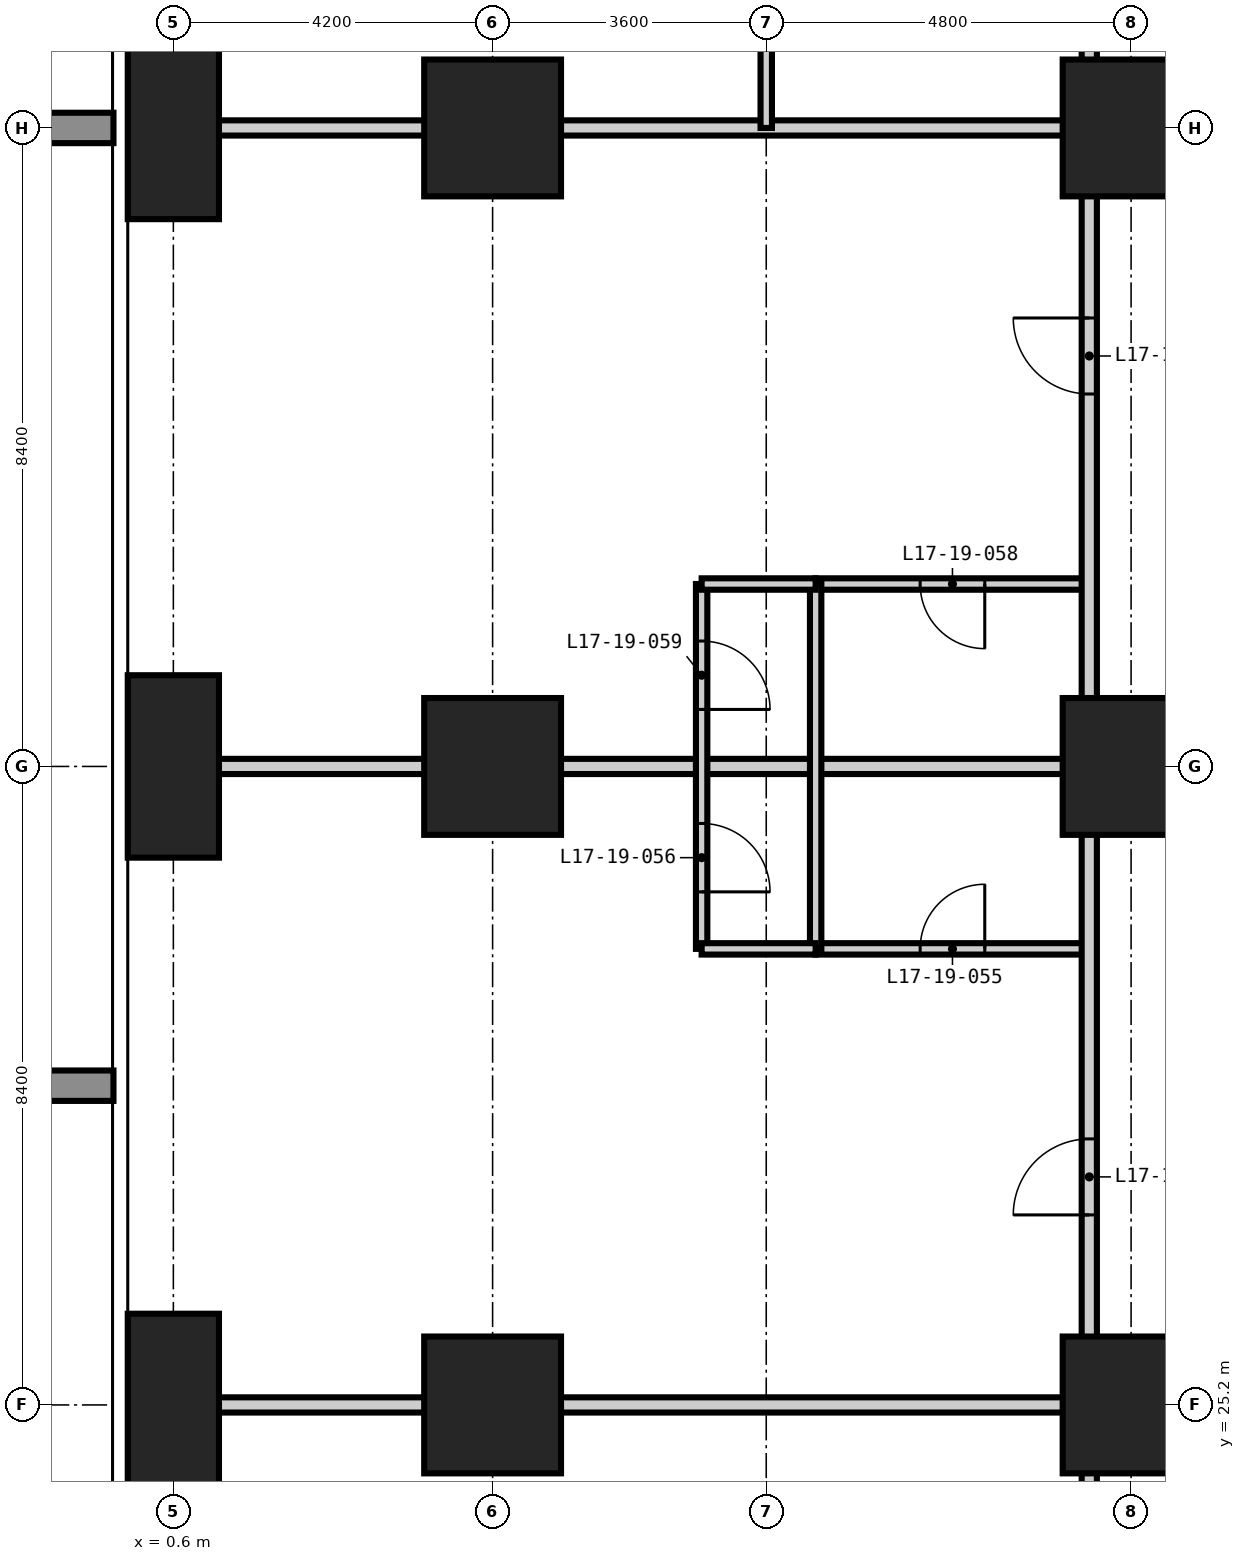
"""IFC4 building model, lengths in metres.
Left out: names, types, materials, properties, quantities, classifications, styles, units other than length and angle.
Written with IfcOpenShell. Run it as: python <this file> out.ifc"""

import sys

from ifc_helpers import new_model, si_unit, direction, frame, frame_2d, origin, origin_2d, place, context, subcontext, project, spatial, rectangle, extrude, element, fill, save


model = new_model("IFC4")
c1 = context("Model", 3, precision=1e-05, world=origin(), true_north=direction((0.0, 1.0)))
c2 = subcontext(c1, "Body", "Model", "MODEL_VIEW")
j1 = project(units=[si_unit("LENGTHUNIT", "METRE"), si_unit("PLANEANGLEUNIT", "RADIAN")], contexts=[c1])
p1 = place(None, origin())
s1 = spatial("IfcSite", under=j1, at=p1, CompositionType="ELEMENT")
p2 = place(p1, origin())
s2 = spatial("IfcBuilding", under=s1, at=p2, CompositionType="ELEMENT")
p3 = place(p2, frame((0.0, 0.0, 70.2)))
s3 = spatial("IfcBuildingStorey", under=s2, at=p3, CompositionType="ELEMENT", Elevation=70.2)
for number, where, z_axis, x_axis in (
    (1, (0.6, 25.2, -0.35), (0.0, 0.0, 1.0), (1.0, 0.0, 0.0)),
    (2, (0.6, 33.6, -0.35), (0.0, 0.0, 1.0), (1.0, 0.0, 0.0)),
    (3, (0.6, 42.0, -0.35), (0.0, 0.0, 1.0), (1.0, 0.0, 0.0)),
):
    element("IfcColumn", number, at=place(p3, frame(where, z_axis=z_axis, x_axis=x_axis)), inside=s3, PredefinedType="COLUMN", context=c2, shape_type="SweptSolid", body=[
        extrude(rectangle(XDim=1.2, YDim=2.4, at=origin_2d()), origin(), (0.0, 0.0, 1.0), 3.6),
    ])
for number, where, z_axis, x_axis in (
    (4, (4.8, 25.2, -0.35), (0.0, 0.0, 1.0), (1.0, 0.0, 0.0)),
    (5, (4.8, 33.6, -0.35), (0.0, 0.0, 1.0), (1.0, 0.0, 0.0)),
    (6, (4.8, 42.0, -0.35), (0.0, 0.0, 1.0), (1.0, 0.0, 0.0)),
    (7, (13.2, 25.2, -0.35), (0.0, 0.0, 1.0), (1.0, 0.0, 0.0)),
    (8, (13.2, 33.6, -0.35), (0.0, 0.0, 1.0), (1.0, 0.0, 0.0)),
    (9, (13.2, 42.0, -0.35), (0.0, 0.0, 1.0), (1.0, 0.0, 0.0)),
):
    element("IfcColumn", number, at=place(p3, frame(where, z_axis=z_axis, x_axis=x_axis)), inside=s3, PredefinedType="COLUMN", context=c2, shape_type="SweptSolid", body=[
        extrude(rectangle(XDim=1.8, YDim=1.8, at=origin_2d()), origin(), (0.0, 0.0, 1.0), 3.6),
    ])
p4 = place(p3, frame((9.05, 31.2, 0.0), z_axis=(0.0, 0.0, 1.0), x_axis=(1.0, 0.0, 0.0)))
e10 = element("IfcWall", 10, at=p4, inside=s3, PredefinedType="PARTITIONING", context=c2, shape_type="SweptSolid", body=[
    extrude(rectangle(XDim=3.6, YDim=0.15, at=frame_2d((1.8, 0.0))), origin(), (0.0, 0.0, 1.0), 3.25),
])
p5 = place(p4, frame((1.375, 0.0, 0.0)))
e11 = element("IfcOpeningElement", 11, at=p5, cuts=e10, PredefinedType="OPENING", context=c2, shape_type="SweptSolid", body=[
    extrude(rectangle(XDim=0.85, YDim=2.1, at=frame_2d((0.425, 1.05))), frame((0.0, 0.085, 0.0), z_axis=(0.0, -1.0, 0.0), x_axis=(1.0, 0.0, 0.0)), (0.0, 0.0, 1.0), 0.17),
])
p6 = place(p3, frame((9.05, 36.0, 0.0), z_axis=(0.0, 0.0, 1.0), x_axis=(1.0, 0.0, 0.0)))
e12 = element("IfcWall", 12, at=p6, inside=s3, PredefinedType="PARTITIONING", context=c2, shape_type="SweptSolid", body=[
    extrude(rectangle(XDim=3.6, YDim=0.15, at=frame_2d((1.8, 0.0))), origin(), (0.0, 0.0, 1.0), 3.25),
])
p7 = place(p6, frame((1.375, 0.0, 0.0)))
e13 = element("IfcOpeningElement", 13, at=p7, cuts=e12, PredefinedType="OPENING", context=c2, shape_type="SweptSolid", body=[
    extrude(rectangle(XDim=0.85, YDim=2.1, at=frame_2d((0.425, 1.05))), frame((0.0, 0.085, 0.0), z_axis=(0.0, -1.0, 0.0), x_axis=(1.0, 0.0, 0.0)), (0.0, 0.0, 1.0), 0.17),
])
p8 = place(p3, frame((12.65, 12.65, 0.0), z_axis=(0.0, 0.0, 1.0), x_axis=(0.0, 1.0, 0.0)))
e14 = element("IfcWall", 14, at=p8, inside=s3, PredefinedType="PARTITIONING", context=c2, shape_type="SweptSolid", body=[
    extrude(rectangle(XDim=32.9, YDim=0.2, at=frame_2d((16.45, 0.0))), origin(), (0.0, 0.0, 1.0), 3.25),
])
p9 = place(p8, frame((9.05, 0.0, 0.0)))
e15 = element("IfcOpeningElement", 15, at=p9, cuts=e14, PredefinedType="OPENING", context=c2, shape_type="SweptSolid", body=[
    extrude(rectangle(XDim=1.0, YDim=2.2, at=frame_2d((0.5, 1.1))), frame((0.0, 0.11, 0.0), z_axis=(0.0, -1.0, 0.0), x_axis=(1.0, 0.0, 0.0)), (0.0, 0.0, 1.0), 0.22),
])
p10 = place(p8, frame((15.05, 0.0, 0.0)))
e16 = element("IfcOpeningElement", 16, at=p10, cuts=e14, PredefinedType="OPENING", context=c2, shape_type="SweptSolid", body=[
    extrude(rectangle(XDim=1.0, YDim=2.2, at=frame_2d((0.5, 1.1))), frame((0.0, 0.11, 0.0), z_axis=(0.0, -1.0, 0.0), x_axis=(1.0, 0.0, 0.0)), (0.0, 0.0, 1.0), 0.22),
])
p11 = place(p8, frame((25.85, 0.0, 0.0)))
e17 = element("IfcOpeningElement", 17, at=p11, cuts=e14, PredefinedType="OPENING", context=c2, shape_type="SweptSolid", body=[
    extrude(rectangle(XDim=1.0, YDim=2.2, at=frame_2d((0.5, 1.1))), frame((0.0, 0.11, 0.0), z_axis=(0.0, -1.0, 0.0), x_axis=(1.0, 0.0, 0.0)), (0.0, 0.0, 1.0), 0.22),
])
p12 = place(p8, frame((1.575, 0.0, 0.0)))
e18 = element("IfcOpeningElement", 18, at=p12, cuts=e14, PredefinedType="OPENING", context=c2, shape_type="SweptSolid", body=[
    extrude(rectangle(XDim=1.0, YDim=2.2, at=frame_2d((0.5, 1.1))), frame((0.0, 0.11, 0.0), z_axis=(0.0, -1.0, 0.0), x_axis=(1.0, 0.0, 0.0)), (0.0, 0.0, 1.0), 0.22),
])
p13 = place(p8, frame((30.625, 0.0, 0.0)))
e19 = element("IfcOpeningElement", 19, at=p13, cuts=e14, PredefinedType="OPENING", context=c2, shape_type="SweptSolid", body=[
    extrude(rectangle(XDim=1.0, YDim=2.2, at=frame_2d((0.5, 1.1))), frame((0.0, 0.11, 0.0), z_axis=(0.0, -1.0, 0.0), x_axis=(1.0, 0.0, 0.0)), (0.0, 0.0, 1.0), 0.22),
])
for number, where, z_axis, x_axis in (
    (20, (-0.008, 25.2, 0.0), (0.0, 0.0, 1.0), (1.0, 0.0, 0.0)),
    (21, (-0.008, 33.6, 0.0), (0.0, 0.0, 1.0), (1.0, 0.0, 0.0)),
    (22, (-0.008, 42.0, 0.0), (0.0, 0.0, 1.0), (1.0, 0.0, 0.0)),
):
    element("IfcWall", number, at=place(p3, frame(where, z_axis=z_axis, x_axis=x_axis)), inside=s3, PredefinedType="PARTITIONING", context=c2, shape_type="SweptSolid", body=[
        extrude(rectangle(XDim=12.658, YDim=0.2, at=frame_2d((6.329, 0.0))), origin(), (0.0, 0.0, 1.0), 3.25),
    ])
p14 = place(p3, frame((7.55, 31.2, 0.0), z_axis=(0.0, 0.0, 1.0), x_axis=(0.0, 1.0, 0.0)))
e23 = element("IfcWall", 23, at=p14, inside=s3, PredefinedType="PARTITIONING", context=c2, shape_type="SweptSolid", body=[
    extrude(rectangle(XDim=4.8, YDim=0.15, at=frame_2d((2.4, 0.0))), origin(), (0.0, 0.0, 1.0), 3.25),
])
p15 = place(p14, frame((0.75, 0.0, 0.0)))
e24 = element("IfcOpeningElement", 24, at=p15, cuts=e23, PredefinedType="OPENING", context=c2, shape_type="SweptSolid", body=[
    extrude(rectangle(XDim=0.9, YDim=2.1, at=frame_2d((0.45, 1.05))), frame((0.0, 0.085, 0.0), z_axis=(0.0, -1.0, 0.0), x_axis=(1.0, 0.0, 0.0)), (0.0, 0.0, 1.0), 0.17),
])
p16 = place(p14, frame((3.15, 0.0, 0.0)))
e25 = element("IfcOpeningElement", 25, at=p16, cuts=e23, PredefinedType="OPENING", context=c2, shape_type="SweptSolid", body=[
    extrude(rectangle(XDim=0.9, YDim=2.1, at=frame_2d((0.45, 1.05))), frame((0.0, 0.085, 0.0), z_axis=(0.0, -1.0, 0.0), x_axis=(1.0, 0.0, 0.0)), (0.0, 0.0, 1.0), 0.17),
])
p17 = place(p3, frame((8.4, 42.0, 0.0), z_axis=(0.0, 0.0, 1.0), x_axis=(0.0, 1.0, 0.0)))
e26 = element("IfcWall", 26, at=p17, inside=s3, PredefinedType="PARTITIONING", context=c2, shape_type="SweptSolid", body=[
    extrude(rectangle(XDim=16.808, YDim=0.15, at=frame_2d((8.404, 0.0))), origin(), (0.0, 0.0, 1.0), 3.25),
])
p18 = place(p17, frame((13.95, 0.0, 0.0)))
e27 = element("IfcOpeningElement", 27, at=p18, cuts=e26, PredefinedType="OPENING", context=c2, shape_type="SweptSolid", body=[
    extrude(rectangle(XDim=0.9, YDim=2.1, at=frame_2d((0.45, 1.05))), frame((0.0, 0.085, 0.0), z_axis=(0.0, -1.0, 0.0), x_axis=(1.0, 0.0, 0.0)), (0.0, 0.0, 1.0), 0.17),
])
p19 = place(p17, frame((3.75, 0.0, 0.0)))
e28 = element("IfcOpeningElement", 28, at=p19, cuts=e26, PredefinedType="OPENING", context=c2, shape_type="SweptSolid", body=[
    extrude(rectangle(XDim=0.9, YDim=2.1, at=frame_2d((0.45, 1.05))), frame((0.0, 0.085, 0.0), z_axis=(0.0, -1.0, 0.0), x_axis=(1.0, 0.0, 0.0)), (0.0, 0.0, 1.0), 0.17),
])
p20 = place(p3, frame((9.05, 31.2, 0.0), z_axis=(0.0, 0.0, 1.0), x_axis=(0.0, 1.0, 0.0)))
e29 = element("IfcWall", 29, at=p20, inside=s3, PredefinedType="PARTITIONING", context=c2, shape_type="SweptSolid", body=[
    extrude(rectangle(XDim=4.8, YDim=0.15, at=frame_2d((2.4, 0.0))), origin(), (0.0, 0.0, 1.0), 3.25),
])
for number, where, z_axis, x_axis in (
    (30, (7.55, 31.2, 0.0), (0.0, 0.0, 1.0), (1.0, 0.0, 0.0)),
    (31, (7.55, 36.0, 0.0), (0.0, 0.0, 1.0), (1.0, 0.0, 0.0)),
):
    element("IfcWall", number, at=place(p3, frame(where, z_axis=z_axis, x_axis=x_axis)), inside=s3, PredefinedType="PARTITIONING", context=c2, shape_type="SweptSolid", body=[
        extrude(rectangle(XDim=1.5, YDim=0.15, at=frame_2d((0.75, 0.0))), origin(), (0.0, 0.0, 1.0), 3.25),
    ])
p21 = place(p10, origin())
e32 = element("IfcDoor", 32, at=p21, inside=s3, OperationType="SINGLE_SWING_LEFT", PredefinedType="DOOR", context=c2, shape_type="SweptSolid", body=[
    extrude(rectangle(XDim=1.0, YDim=2.2, at=frame_2d((0.5, 1.1))), frame((0.0, 0.025, 0.0), z_axis=(0.0, -1.0, 0.0), x_axis=(1.0, 0.0, 0.0)), (0.0, 0.0, 1.0), 0.05),
])
fill(e16, e32)
p22 = place(p5, origin())
e33 = element("IfcDoor", 33, at=p22, inside=s3, OperationType="SINGLE_SWING_RIGHT", PredefinedType="DOOR", context=c2, shape_type="SweptSolid", body=[
    extrude(rectangle(XDim=0.85, YDim=2.1, at=frame_2d((0.425, 1.05))), frame((0.0, 0.025, 0.0), z_axis=(0.0, -1.0, 0.0), x_axis=(1.0, 0.0, 0.0)), (0.0, 0.0, 1.0), 0.05),
])
fill(e11, e33)
p23 = place(p15, frame((0.9, 0.0, 0.0), z_axis=(0.0, 0.0, 1.0), x_axis=(-1.0, 0.0, 0.0)))
e34 = element("IfcDoor", 34, at=p23, inside=s3, OperationType="SINGLE_SWING_RIGHT", PredefinedType="DOOR", context=c2, shape_type="SweptSolid", body=[
    extrude(rectangle(XDim=0.9, YDim=2.1, at=frame_2d((0.45, 1.05))), frame((0.0, 0.025, 0.0), z_axis=(0.0, -1.0, 0.0), x_axis=(1.0, 0.0, 0.0)), (0.0, 0.0, 1.0), 0.05),
])
fill(e24, e34)
p24 = place(p11, origin())
e35 = element("IfcDoor", 35, at=p24, inside=s3, OperationType="SINGLE_SWING_RIGHT", PredefinedType="DOOR", context=c2, shape_type="SweptSolid", body=[
    extrude(rectangle(XDim=1.0, YDim=2.2, at=frame_2d((0.5, 1.1))), frame((0.0, 0.025, 0.0), z_axis=(0.0, -1.0, 0.0), x_axis=(1.0, 0.0, 0.0)), (0.0, 0.0, 1.0), 0.05),
])
fill(e17, e35)
p25 = place(p7, frame((0.85, 0.0, 0.0), z_axis=(0.0, 0.0, 1.0), x_axis=(-1.0, 0.0, 0.0)))
e36 = element("IfcDoor", 36, at=p25, inside=s3, OperationType="SINGLE_SWING_LEFT", PredefinedType="DOOR", context=c2, shape_type="SweptSolid", body=[
    extrude(rectangle(XDim=0.85, YDim=2.1, at=frame_2d((0.425, 1.05))), frame((0.0, 0.025, 0.0), z_axis=(0.0, -1.0, 0.0), x_axis=(1.0, 0.0, 0.0)), (0.0, 0.0, 1.0), 0.05),
])
fill(e13, e36)
p26 = place(p16, frame((0.9, 0.0, 0.0), z_axis=(0.0, 0.0, 1.0), x_axis=(-1.0, 0.0, 0.0)))
e37 = element("IfcDoor", 37, at=p26, inside=s3, OperationType="SINGLE_SWING_RIGHT", PredefinedType="DOOR", context=c2, shape_type="SweptSolid", body=[
    extrude(rectangle(XDim=0.9, YDim=2.1, at=frame_2d((0.45, 1.05))), frame((0.0, 0.025, 0.0), z_axis=(0.0, -1.0, 0.0), x_axis=(1.0, 0.0, 0.0)), (0.0, 0.0, 1.0), 0.05),
])
fill(e25, e37)
save(model, sys.argv[1])
